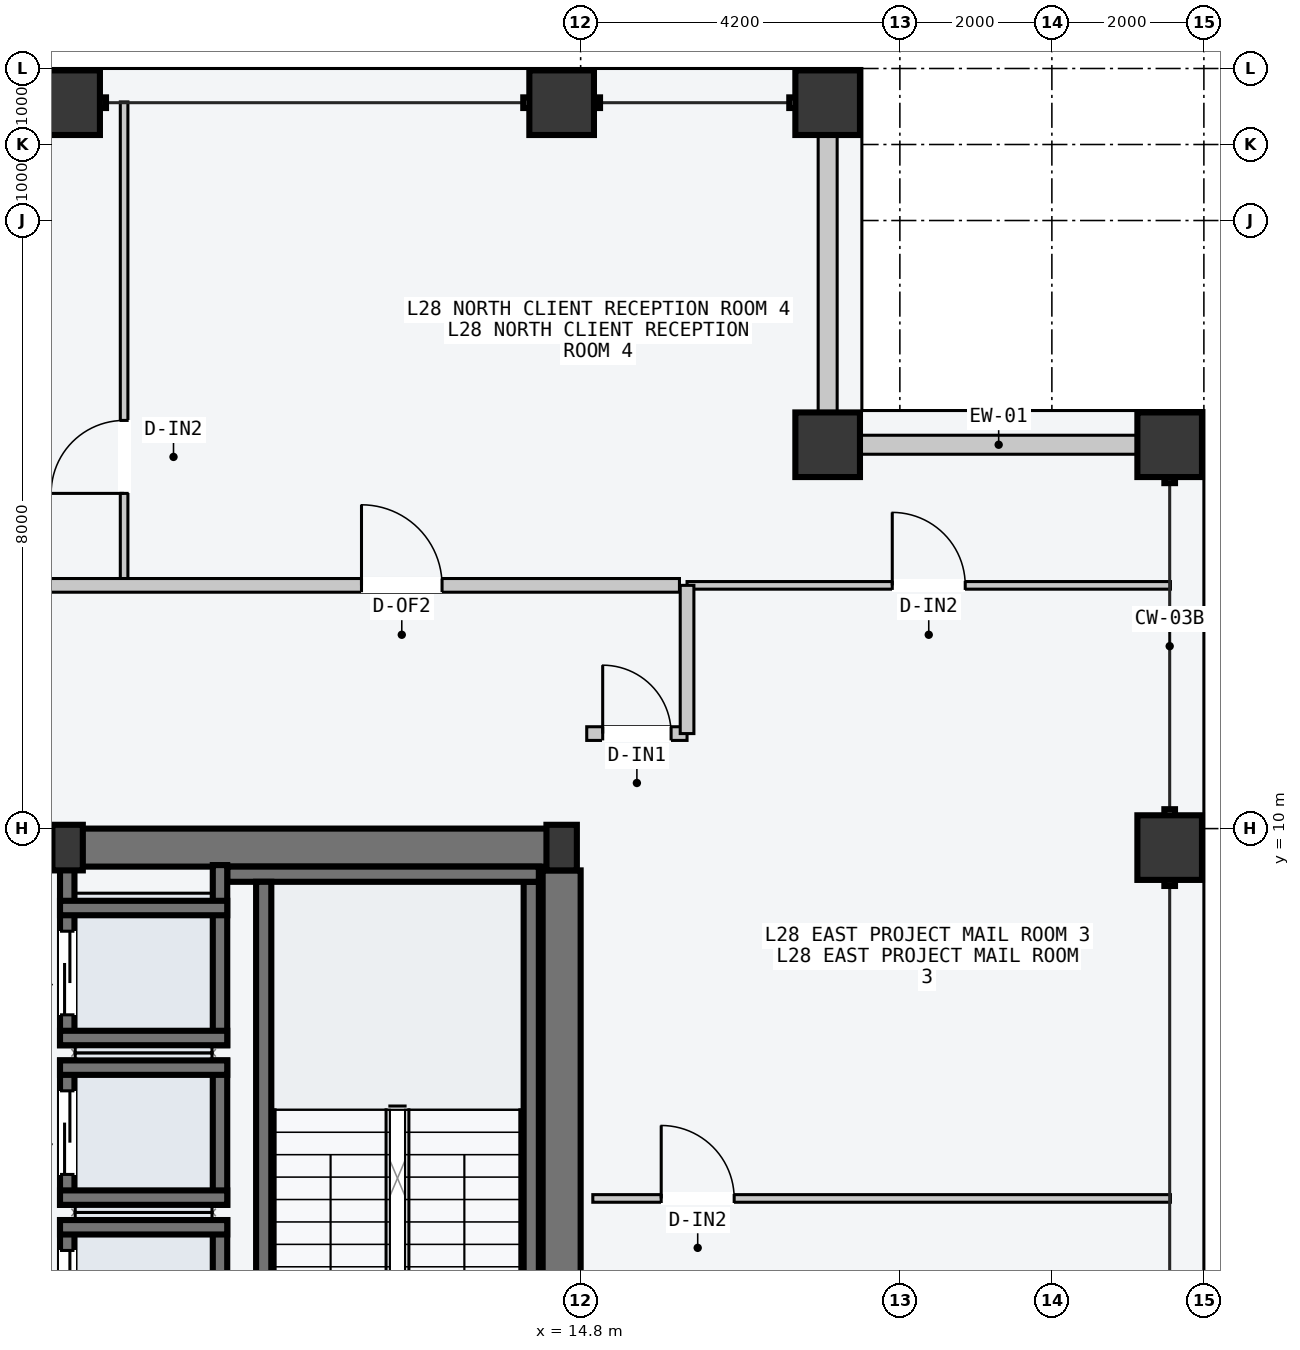
"""IFC4 building model, lengths in metres.
Left out: names, types, materials, properties, quantities, classifications, styles, units other than length and angle.
Written with IfcOpenShell. Run it as: python <this file> out.ifc"""

import sys

from ifc_helpers import new_model, si_unit, direction, frame, frame_2d, origin, origin_2d, place, context, subcontext, project, spatial, rectangle, hollow_rectangle, i_section, extrude, element, fill, save


model = new_model("IFC4")
c1 = context("Model", 3, precision=1e-05, world=origin(), true_north=direction((0.0, 1.0)))
c2 = subcontext(c1, "Body", "Model", "MODEL_VIEW")
j1 = project(units=[si_unit("LENGTHUNIT", "METRE"), si_unit("PLANEANGLEUNIT", "RADIAN")], contexts=[c1])
p1 = place(None, origin())
s1 = spatial("IfcSite", under=j1, at=p1, CompositionType="ELEMENT")
p2 = place(p1, origin())
s2 = spatial("IfcBuilding", under=s1, at=p2, CompositionType="ELEMENT")
p3 = place(p2, frame((0.0, 0.0, 109.8)))
s3 = spatial("IfcBuildingStorey", under=s2, at=p3, CompositionType="ELEMENT", Elevation=109.8)
p4 = place(p3, frame((8.07, 9.75, -0.2), z_axis=(0.0, 0.0, 1.0), x_axis=(1.0, 0.0, 0.0)))
e1 = element("IfcWall", 1, at=p4, inside=s3, PredefinedType="SHEAR", context=c2, shape_type="SweptSolid", body=[
    extrude(rectangle(XDim=6.46, YDim=0.5, at=frame_2d((3.23, 0.0))), origin(), (0.0, 0.0, 1.0), 3.6),
])
p5 = place(p3, frame((14.55, 0.3, -0.2), z_axis=(0.0, 0.0, 1.0), x_axis=(0.0, 1.0, 0.0)))
e2 = element("IfcWall", 2, at=p5, inside=s3, PredefinedType="SHEAR", context=c2, shape_type="SweptSolid", body=[
    extrude(rectangle(XDim=9.15, YDim=0.5, at=frame_2d((4.575, 0.0))), origin(), (0.0, 0.0, 1.0), 3.6),
])
p6 = place(p3, frame((14.15, 1.5, -0.2), z_axis=(0.0, 0.0, 1.0), x_axis=(0.0, 1.0, 0.0)))
e3 = element("IfcWall", 3, at=p6, inside=s3, PredefinedType="SOLIDWALL", context=c2, shape_type="SweptSolid", body=[
    extrude(rectangle(XDim=7.8, YDim=0.2, at=frame_2d((3.9, 0.0))), origin(), (0.0, 0.0, 1.0), 3.6),
])
p7 = place(p3, frame((10.15, 9.4, -0.2), z_axis=(0.0, 0.0, 1.0), x_axis=(1.0, 0.0, 0.0)))
e4 = element("IfcWall", 4, at=p7, inside=s3, PredefinedType="SOLIDWALL", context=c2, shape_type="SweptSolid", body=[
    extrude(rectangle(XDim=4.1, YDim=0.2, at=frame_2d((2.05, 0.0))), origin(), (0.0, 0.0, 1.0), 3.6),
])
p8 = place(p3, frame((10.63, 1.5, -0.2), z_axis=(0.0, 0.0, 1.0), x_axis=(0.0, 1.0, 0.0)))
e5 = element("IfcWall", 5, at=p8, inside=s3, PredefinedType="SOLIDWALL", context=c2, shape_type="SweptSolid", body=[
    extrude(rectangle(XDim=7.8, YDim=0.2, at=frame_2d((3.9, 0.0))), origin(), (0.0, 0.0, 1.0), 3.6),
])
for number, where, z_axis, x_axis in (
    (6, (8.05, 9.75, 0.0), (0.0, 0.0, 1.0), (1.0, 0.0, 0.0)),
    (7, (14.55, 9.75, 0.0), (0.0, 0.0, 1.0), (1.0, 0.0, 0.0)),
):
    element("IfcColumn", number, at=place(p3, frame(where, z_axis=z_axis, x_axis=x_axis)), inside=s3, PredefinedType="COLUMN", context=c2, shape_type="SweptSolid", body=[
        extrude(i_section(OverallWidth=0.4, OverallDepth=0.6, WebThickness=0.022, FlangeThickness=0.036, at=origin_2d()), origin(), (0.0, 0.0, 1.0), 3.6),
    ])
for number, where, z_axis, x_axis in (
    (8, (8.05, 19.55, 0.0), (0.0, 0.0, 1.0), (1.0, 0.0, 0.0)),
    (9, (14.55, 19.55, 0.0), (0.0, 0.0, 1.0), (1.0, 0.0, 0.0)),
    (10, (18.05, 19.55, 0.0), (0.0, 0.0, 1.0), (1.0, 0.0, 0.0)),
    (11, (22.55, 9.75, 0.0), (0.0, 0.0, 1.0), (0.0, 1.0, 0.0)),
    (12, (22.55, 15.05, 0.0), (0.0, 0.0, 1.0), (0.0, 1.0, 0.0)),
    (13, (18.05, 15.05, 0.0), (0.0, 0.0, 1.0), (1.0, 0.0, 0.0)),
):
    element("IfcColumn", number, at=place(p3, frame(where, z_axis=z_axis, x_axis=x_axis)), inside=s3, PredefinedType="COLUMN", context=c2, shape_type="SweptSolid", body=[
        extrude(hollow_rectangle(XDim=0.85, YDim=0.85, WallThickness=0.04, at=origin_2d()), origin(), (0.0, 0.0, 1.0), 3.6),
    ])
for number, where, z_axis, x_axis in (
    (14, (18.485, 15.05, 0.0), (0.0, 0.0, 1.0), (1.0, 0.0, 0.0)),
    (15, (18.05, 15.485, 0.0), (0.0, 0.0, 1.0), (0.0, 1.0, 0.0)),
):
    element("IfcWall", number, at=place(p3, frame(where, z_axis=z_axis, x_axis=x_axis)), inside=s3, PredefinedType="STANDARD", context=c2, shape_type="SweptSolid", body=[
        extrude(rectangle(XDim=3.63, YDim=0.25, at=frame_2d((1.815, 0.0))), origin(), (0.0, 0.0, 1.0), 2.75),
    ])
p9 = place(p3, frame((8.045, 2.95, -0.2), z_axis=(0.0, 0.0, 1.0), x_axis=(0.0, 1.0, 0.0)))
e16 = element("IfcWall", 16, at=p9, inside=s3, PredefinedType="SOLIDWALL", context=c2, shape_type="SweptSolid", body=[
    extrude(rectangle(XDim=1.9, YDim=0.19, at=frame_2d((0.95, 0.0))), origin(), (0.0, 0.0, 1.0), 3.6),
])
p10 = place(p9, frame((0.4, 0.0, 0.2)))
e17 = element("IfcOpeningElement", 17, at=p10, cuts=e16, PredefinedType="OPENING", context=c2, shape_type="SweptSolid", body=[
    extrude(rectangle(XDim=1.1, YDim=2.2, at=frame_2d((0.55, 1.1))), frame((0.0, 0.105, 0.0), z_axis=(0.0, -1.0, 0.0), x_axis=(1.0, 0.0, 0.0)), (0.0, 0.0, 1.0), 0.21),
])
p11 = place(p3, frame((10.055, 2.95, -0.2), z_axis=(0.0, 0.0, 1.0), x_axis=(0.0, 1.0, 0.0)))
e18 = element("IfcWall", 18, at=p11, inside=s3, PredefinedType="SOLIDWALL", context=c2, shape_type="SweptSolid", body=[
    extrude(rectangle(XDim=1.9, YDim=0.19, at=frame_2d((0.95, 0.0))), origin(), (0.0, 0.0, 1.0), 3.6),
])
p12 = place(p3, frame((7.95, 4.755, -0.2), z_axis=(0.0, 0.0, 1.0), x_axis=(1.0, 0.0, 0.0)))
e19 = element("IfcWall", 19, at=p12, inside=s3, PredefinedType="SOLIDWALL", context=c2, shape_type="SweptSolid", body=[
    extrude(rectangle(XDim=2.2, YDim=0.19, at=frame_2d((1.1, 0.0))), origin(), (0.0, 0.0, 1.0), 3.6),
])
p13 = place(p3, frame((8.045, 5.05, -0.2), z_axis=(0.0, 0.0, 1.0), x_axis=(0.0, 1.0, 0.0)))
e20 = element("IfcWall", 20, at=p13, inside=s3, PredefinedType="SOLIDWALL", context=c2, shape_type="SweptSolid", body=[
    extrude(rectangle(XDim=1.9, YDim=0.19, at=frame_2d((0.95, 0.0))), origin(), (0.0, 0.0, 1.0), 3.6),
])
p14 = place(p13, frame((0.4, 0.0, 0.2)))
e21 = element("IfcOpeningElement", 21, at=p14, cuts=e20, PredefinedType="OPENING", context=c2, shape_type="SweptSolid", body=[
    extrude(rectangle(XDim=1.1, YDim=2.2, at=frame_2d((0.55, 1.1))), frame((0.0, 0.105, 0.0), z_axis=(0.0, -1.0, 0.0), x_axis=(1.0, 0.0, 0.0)), (0.0, 0.0, 1.0), 0.21),
])
p15 = place(p3, frame((10.055, 5.05, -0.2), z_axis=(0.0, 0.0, 1.0), x_axis=(0.0, 1.0, 0.0)))
e22 = element("IfcWall", 22, at=p15, inside=s3, PredefinedType="SOLIDWALL", context=c2, shape_type="SweptSolid", body=[
    extrude(rectangle(XDim=1.9, YDim=0.19, at=frame_2d((0.95, 0.0))), origin(), (0.0, 0.0, 1.0), 3.6),
])
for number, where, z_axis, x_axis in (
    (23, (7.95, 6.855, -0.2), (0.0, 0.0, 1.0), (1.0, 0.0, 0.0)),
    (24, (7.95, 5.145, -0.2), (0.0, 0.0, 1.0), (1.0, 0.0, 0.0)),
):
    element("IfcWall", number, at=place(p3, frame(where, z_axis=z_axis, x_axis=x_axis)), inside=s3, PredefinedType="SOLIDWALL", context=c2, shape_type="SweptSolid", body=[
        extrude(rectangle(XDim=2.2, YDim=0.19, at=frame_2d((1.1, 0.0))), origin(), (0.0, 0.0, 1.0), 3.6),
    ])
p16 = place(p3, frame((8.045, 7.15, -0.2), z_axis=(0.0, 0.0, 1.0), x_axis=(0.0, 1.0, 0.0)))
e25 = element("IfcWall", 25, at=p16, inside=s3, PredefinedType="SOLIDWALL", context=c2, shape_type="SweptSolid", body=[
    extrude(rectangle(XDim=2.37, YDim=0.19, at=frame_2d((1.185, 0.0))), origin(), (0.0, 0.0, 1.0), 3.6),
])
p17 = place(p16, frame((0.4, 0.0, 0.2)))
e26 = element("IfcOpeningElement", 26, at=p17, cuts=e25, PredefinedType="OPENING", context=c2, shape_type="SweptSolid", body=[
    extrude(rectangle(XDim=1.1, YDim=2.2, at=frame_2d((0.55, 1.1))), frame((0.0, 0.105, 0.0), z_axis=(0.0, -1.0, 0.0), x_axis=(1.0, 0.0, 0.0)), (0.0, 0.0, 1.0), 0.21),
])
p18 = place(p3, frame((10.055, 7.15, -0.2), z_axis=(0.0, 0.0, 1.0), x_axis=(0.0, 1.0, 0.0)))
e27 = element("IfcWall", 27, at=p18, inside=s3, PredefinedType="SOLIDWALL", context=c2, shape_type="SweptSolid", body=[
    extrude(rectangle(XDim=2.37, YDim=0.19, at=frame_2d((1.185, 0.0))), origin(), (0.0, 0.0, 1.0), 3.6),
])
for number, where, z_axis, x_axis in (
    (28, (7.95, 8.955, -0.2), (0.0, 0.0, 1.0), (1.0, 0.0, 0.0)),
    (29, (7.95, 7.245, -0.2), (0.0, 0.0, 1.0), (1.0, 0.0, 0.0)),
):
    element("IfcWall", number, at=place(p3, frame(where, z_axis=z_axis, x_axis=x_axis)), inside=s3, PredefinedType="SOLIDWALL", context=c2, shape_type="SweptSolid", body=[
        extrude(rectangle(XDim=2.2, YDim=0.19, at=frame_2d((1.1, 0.0))), origin(), (0.0, 0.0, 1.0), 3.6),
    ])
p19 = place(p3, frame((8.793, 13.26, 0.0), z_axis=(0.0, 0.0, 1.0), x_axis=(0.0, 1.0, 0.0)))
e30 = element("IfcWall", 30, at=p19, inside=s3, PredefinedType="PARTITIONING", context=c2, shape_type="SweptSolid", body=[
    extrude(rectangle(XDim=6.3, YDim=0.1, at=frame_2d((3.15, 0.0))), origin(), (0.0, 0.0, 1.0), 3.4),
])
p20 = place(p19, frame((1.15, 0.0, 0.0)))
e31 = element("IfcOpeningElement", 31, at=p20, cuts=e30, PredefinedType="OPENING", context=c2, shape_type="SweptSolid", body=[
    extrude(rectangle(XDim=0.96, YDim=2.18, at=frame_2d((0.48, 1.09))), frame((0.0, 0.06, 0.0), z_axis=(0.0, -1.0, 0.0), x_axis=(1.0, 0.0, 0.0)), (0.0, 0.0, 1.0), 0.12),
])
p21 = place(p3, frame((-16.1, 13.2, 0.0), z_axis=(0.0, 0.0, 1.0), x_axis=(1.0, 0.0, 0.0)))
e32 = element("IfcWall", 32, at=p21, inside=s3, PredefinedType="PARTITIONING", context=c2, shape_type="SweptSolid", body=[
    extrude(rectangle(XDim=32.2, YDim=0.18, at=frame_2d((16.1, 0.0))), origin(), (0.0, 0.0, 1.0), 3.4),
])
p22 = place(p21, frame((2.865, 0.0, 0.0)))
e33 = element("IfcOpeningElement", 33, at=p22, cuts=e32, PredefinedType="OPENING", context=c2, shape_type="SweptSolid", body=[
    extrude(rectangle(XDim=0.9, YDim=2.15, at=frame_2d((0.45, 1.075))), frame((0.0, 0.1, 0.0), z_axis=(0.0, -1.0, 0.0), x_axis=(1.0, 0.0, 0.0)), (0.0, 0.0, 1.0), 0.2),
])
p23 = place(p21, frame((11.731, 0.0, 0.0)))
e34 = element("IfcOpeningElement", 34, at=p23, cuts=e32, PredefinedType="OPENING", context=c2, shape_type="SweptSolid", body=[
    extrude(rectangle(XDim=0.96, YDim=2.18, at=frame_2d((0.48, 1.09))), frame((0.0, 0.1, 0.0), z_axis=(0.0, -1.0, 0.0), x_axis=(1.0, 0.0, 0.0)), (0.0, 0.0, 1.0), 0.2),
])
p24 = place(p21, frame((20.832, 0.0, 0.0)))
e35 = element("IfcOpeningElement", 35, at=p24, cuts=e32, PredefinedType="OPENING", context=c2, shape_type="SweptSolid", body=[
    extrude(rectangle(XDim=1.02, YDim=2.2, at=frame_2d((0.51, 1.1))), frame((0.0, 0.1, 0.0), z_axis=(0.0, -1.0, 0.0), x_axis=(1.0, 0.0, 0.0)), (0.0, 0.0, 1.0), 0.2),
])
p25 = place(p21, frame((28.017, 0.0, 0.0)))
e36 = element("IfcOpeningElement", 36, at=p25, cuts=e32, PredefinedType="OPENING", context=c2, shape_type="SweptSolid", body=[
    extrude(rectangle(XDim=1.06, YDim=2.2, at=frame_2d((0.53, 1.1))), frame((0.0, 0.1, 0.0), z_axis=(0.0, -1.0, 0.0), x_axis=(1.0, 0.0, 0.0)), (0.0, 0.0, 1.0), 0.2),
])
p26 = place(p3, frame((16.2, 13.2, 0.0), z_axis=(0.0, 0.0, 1.0), x_axis=(1.0, 0.0, 0.0)))
e37 = element("IfcWall", 37, at=p26, inside=s3, PredefinedType="PARTITIONING", context=c2, shape_type="SweptSolid", body=[
    extrude(rectangle(XDim=6.36, YDim=0.1, at=frame_2d((3.18, 0.0))), origin(), (0.0, 0.0, 1.0), 3.4),
])
p27 = place(p26, frame((2.7, 0.0, 0.0)))
e38 = element("IfcOpeningElement", 38, at=p27, cuts=e37, PredefinedType="OPENING", context=c2, shape_type="SweptSolid", body=[
    extrude(rectangle(XDim=0.96, YDim=2.18, at=frame_2d((0.48, 1.09))), frame((0.0, 0.06, 0.0), z_axis=(0.0, -1.0, 0.0), x_axis=(1.0, 0.0, 0.0)), (0.0, 0.0, 1.0), 0.12),
])
p28 = place(p3, frame((14.88, 11.25, 0.0), z_axis=(0.0, 0.0, 1.0), x_axis=(1.0, 0.0, 0.0)))
e39 = element("IfcWall", 39, at=p28, inside=s3, PredefinedType="PARTITIONING", context=c2, shape_type="SweptSolid", body=[
    extrude(rectangle(XDim=1.32, YDim=0.18, at=frame_2d((0.66, 0.0))), origin(), (0.0, 0.0, 1.0), 3.4),
])
p29 = place(p28, frame((0.21, 0.0, 0.0)))
e40 = element("IfcOpeningElement", 40, at=p29, cuts=e39, PredefinedType="OPENING", context=c2, shape_type="SweptSolid", body=[
    extrude(rectangle(XDim=0.9, YDim=2.15, at=frame_2d((0.45, 1.075))), frame((0.0, 0.1, 0.0), z_axis=(0.0, -1.0, 0.0), x_axis=(1.0, 0.0, 0.0)), (0.0, 0.0, 1.0), 0.2),
])
p30 = place(p3, frame((16.2, 11.25, 0.0), z_axis=(0.0, 0.0, 1.0), x_axis=(0.0, 1.0, 0.0)))
e41 = element("IfcWall", 41, at=p30, inside=s3, PredefinedType="PARTITIONING", context=c2, shape_type="SweptSolid", body=[
    extrude(rectangle(XDim=1.95, YDim=0.18, at=frame_2d((0.975, 0.0))), origin(), (0.0, 0.0, 1.0), 3.4),
])
p31 = place(p3, frame((14.96, 5.134, 0.0), z_axis=(0.0, 0.0, 1.0), x_axis=(1.0, 0.0, 0.0)))
e42 = element("IfcWall", 42, at=p31, inside=s3, PredefinedType="PARTITIONING", context=c2, shape_type="SweptSolid", body=[
    extrude(rectangle(XDim=7.6, YDim=0.1, at=frame_2d((3.8, 0.0))), origin(), (0.0, 0.0, 1.0), 3.4),
])
p32 = place(p31, frame((0.9, 0.0, 0.0)))
e43 = element("IfcOpeningElement", 43, at=p32, cuts=e42, PredefinedType="OPENING", context=c2, shape_type="SweptSolid", body=[
    extrude(rectangle(XDim=0.96, YDim=2.18, at=frame_2d((0.48, 1.09))), frame((0.0, 0.06, 0.0), z_axis=(0.0, -1.0, 0.0), x_axis=(1.0, 0.0, 0.0)), (0.0, 0.0, 1.0), 0.12),
])
p33 = place(p10, origin())
e44 = element("IfcDoor", 44, at=p33, inside=s3, OperationType="SLIDING_TO_LEFT", PredefinedType="DOOR", context=c2, shape_type="SweptSolid", body=[
    extrude(rectangle(XDim=1.1, YDim=2.2, at=frame_2d((0.55, 1.1))), frame((0.0, 0.025, 0.0), z_axis=(0.0, -1.0, 0.0), x_axis=(1.0, 0.0, 0.0)), (0.0, 0.0, 1.0), 0.05),
])
fill(e17, e44)
p34 = place(p14, origin())
e45 = element("IfcDoor", 45, at=p34, inside=s3, OperationType="SLIDING_TO_LEFT", PredefinedType="DOOR", context=c2, shape_type="SweptSolid", body=[
    extrude(rectangle(XDim=1.1, YDim=2.2, at=frame_2d((0.55, 1.1))), frame((0.0, 0.025, 0.0), z_axis=(0.0, -1.0, 0.0), x_axis=(1.0, 0.0, 0.0)), (0.0, 0.0, 1.0), 0.05),
])
fill(e21, e45)
p35 = place(p17, origin())
e46 = element("IfcDoor", 46, at=p35, inside=s3, OperationType="SLIDING_TO_LEFT", PredefinedType="DOOR", context=c2, shape_type="SweptSolid", body=[
    extrude(rectangle(XDim=1.1, YDim=2.2, at=frame_2d((0.55, 1.1))), frame((0.0, 0.025, 0.0), z_axis=(0.0, -1.0, 0.0), x_axis=(1.0, 0.0, 0.0)), (0.0, 0.0, 1.0), 0.05),
])
fill(e26, e46)
p36 = place(p20, origin())
e47 = element("IfcDoor", 47, at=p36, inside=s3, OperationType="SINGLE_SWING_LEFT", PredefinedType="DOOR", context=c2, shape_type="SweptSolid", body=[
    extrude(rectangle(XDim=0.96, YDim=2.18, at=frame_2d((0.48, 1.09))), frame((0.0, 0.025, 0.0), z_axis=(0.0, -1.0, 0.0), x_axis=(1.0, 0.0, 0.0)), (0.0, 0.0, 1.0), 0.05),
])
fill(e31, e47)
p37 = place(p25, origin())
e48 = element("IfcDoor", 48, at=p37, inside=s3, OperationType="SINGLE_SWING_LEFT", PredefinedType="DOOR", context=c2, shape_type="SweptSolid", body=[
    extrude(rectangle(XDim=1.06, YDim=2.2, at=frame_2d((0.53, 1.1))), frame((0.0, 0.025, 0.0), z_axis=(0.0, -1.0, 0.0), x_axis=(1.0, 0.0, 0.0)), (0.0, 0.0, 1.0), 0.05),
])
fill(e36, e48)
p38 = place(p27, origin())
e49 = element("IfcDoor", 49, at=p38, inside=s3, OperationType="SINGLE_SWING_LEFT", PredefinedType="DOOR", context=c2, shape_type="SweptSolid", body=[
    extrude(rectangle(XDim=0.96, YDim=2.18, at=frame_2d((0.48, 1.09))), frame((0.0, 0.025, 0.0), z_axis=(0.0, -1.0, 0.0), x_axis=(1.0, 0.0, 0.0)), (0.0, 0.0, 1.0), 0.05),
])
fill(e38, e49)
p39 = place(p29, origin())
e50 = element("IfcDoor", 50, at=p39, inside=s3, OperationType="SINGLE_SWING_LEFT", PredefinedType="DOOR", context=c2, shape_type="SweptSolid", body=[
    extrude(rectangle(XDim=0.9, YDim=2.15, at=frame_2d((0.45, 1.075))), frame((0.0, 0.025, 0.0), z_axis=(0.0, -1.0, 0.0), x_axis=(1.0, 0.0, 0.0)), (0.0, 0.0, 1.0), 0.05),
])
fill(e40, e50)
p40 = place(p32, origin())
e51 = element("IfcDoor", 51, at=p40, inside=s3, OperationType="SINGLE_SWING_LEFT", PredefinedType="DOOR", context=c2, shape_type="SweptSolid", body=[
    extrude(rectangle(XDim=0.96, YDim=2.18, at=frame_2d((0.48, 1.09))), frame((0.0, 0.025, 0.0), z_axis=(0.0, -1.0, 0.0), x_axis=(1.0, 0.0, 0.0)), (0.0, 0.0, 1.0), 0.05),
])
fill(e43, e51)
save(model, sys.argv[1])
